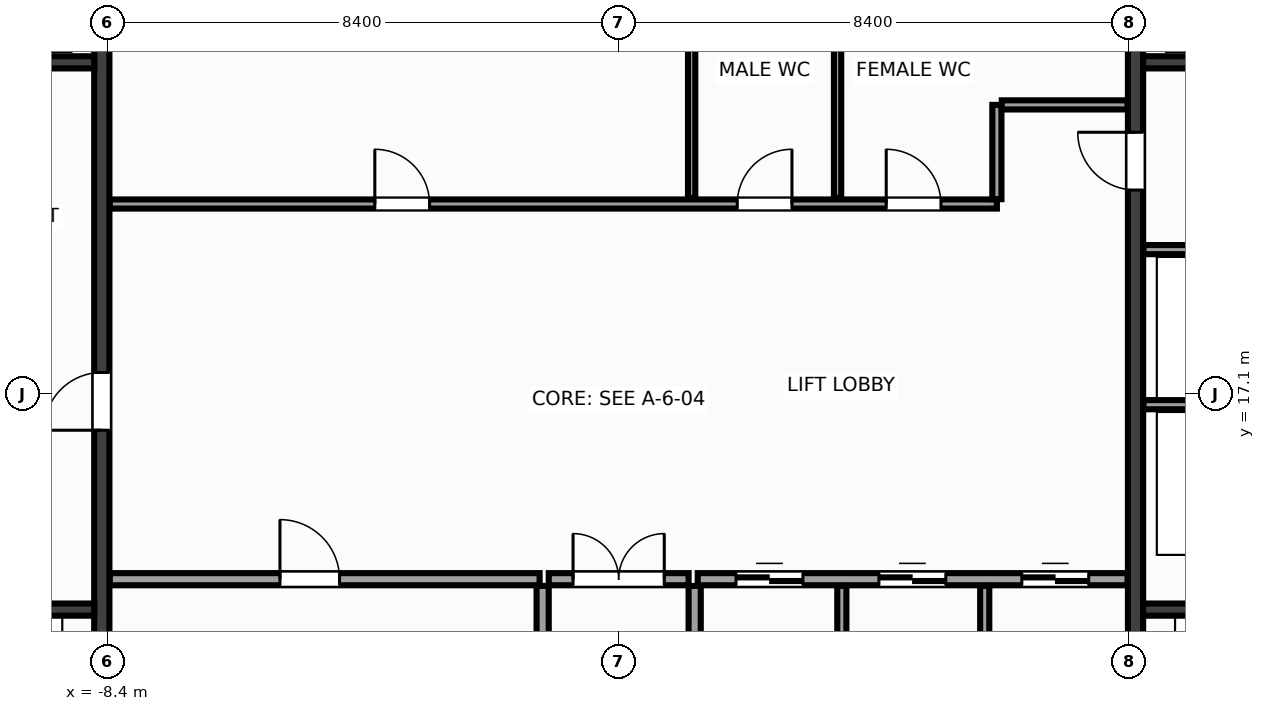
"""IFC4 building model, lengths in metres.
Left out: names, types, materials, properties, quantities, classifications, styles, units other than length and angle.
Written with IfcOpenShell. Run it as: python <this file> out.ifc"""

import sys

from ifc_helpers import new_model, si_unit, direction, frame, frame_2d, origin, place, context, subcontext, project, spatial, rectangle, extrude, source, transform, mapped, element, fill, save


model = new_model("IFC4")
c1 = context("Model", 3, precision=1e-05, world=origin(), true_north=direction((0.0, 1.0)))
c2 = subcontext(c1, "Body", "Model", "MODEL_VIEW")
j1 = project(units=[si_unit("LENGTHUNIT", "METRE"), si_unit("PLANEANGLEUNIT", "RADIAN")], contexts=[c1])
p1 = place(None, origin())
s1 = spatial("IfcSite", under=j1, at=p1, CompositionType="ELEMENT")
p2 = place(p1, origin())
s2 = spatial("IfcBuilding", under=s1, at=p2, CompositionType="ELEMENT")
p3 = place(p2, frame((0.0, 0.0, 84.8)))
s3 = spatial("IfcBuildingStorey", under=s2, at=p3, CompositionType="ELEMENT", Elevation=84.8)
m1 = source(origin(), c2, "Body", "SweptSolid", [
    extrude(rectangle(XDim=12.95, YDim=0.25, at=frame_2d((6.475, 0.0))), origin(), (0.0, 0.0, 1.0), 3.6),
])
p4 = place(p3, frame((-8.5, 10.525, 0.0), z_axis=(0.0, 0.0, 1.0), x_axis=(0.0, 1.0, 0.0)))
e1 = element("IfcWall", 1, at=p4, inside=s3, PredefinedType="SHEAR", context=c2, shape_type="MappedRepresentation", body=[
    mapped(m1, transform((0.0, 0.0, 0.0), x_axis=(1.0, 0.0, 0.0), y_axis=(0.0, 1.0, 0.0), z_axis=(0.0, 0.0, 1.0), scale=1.0)),
])
p5 = place(p4, frame((5.975, 0.0, 0.0)))
e2 = element("IfcOpeningElement", 2, at=p5, cuts=e1, PredefinedType="OPENING", context=c2, shape_type="SweptSolid", body=[
    extrude(rectangle(XDim=0.95, YDim=2.15, at=frame_2d((0.475, 1.075))), frame((0.0, 0.137, 0.0), z_axis=(0.0, -1.0, 0.0), x_axis=(1.0, 0.0, 0.0)), (0.0, 0.0, 1.0), 0.274),
])
p6 = place(p3, frame((8.5, 10.525, 0.0), z_axis=(0.0, 0.0, 1.0), x_axis=(0.0, 1.0, 0.0)))
e3 = element("IfcWall", 3, at=p6, inside=s3, PredefinedType="SHEAR", context=c2, shape_type="MappedRepresentation", body=[
    mapped(m1, transform((0.0, 0.0, 0.0), x_axis=(1.0, 0.0, 0.0), y_axis=(0.0, 1.0, 0.0), z_axis=(0.0, 0.0, 1.0), scale=1.0)),
])
p7 = place(p6, frame((9.925, 0.0, 0.0)))
e4 = element("IfcOpeningElement", 4, at=p7, cuts=e3, PredefinedType="OPENING", context=c2, shape_type="SweptSolid", body=[
    extrude(rectangle(XDim=0.95, YDim=2.15, at=frame_2d((0.475, 1.075))), frame((0.0, 0.137, 0.0), z_axis=(0.0, -1.0, 0.0), x_axis=(1.0, 0.0, 0.0)), (0.0, 0.0, 1.0), 0.274),
])
m2 = source(origin(), c2, "Body", "SweptSolid", [
    extrude(rectangle(XDim=2.825, YDim=0.2, at=frame_2d((1.413, 0.0))), origin(), (0.0, 0.0, 1.0), 3.6),
])
for number, where, z_axis, x_axis in (
    (5, (-11.45, 13.55, 0.0), (0.0, 0.0, 1.0), (1.0, 0.0, 0.0)),
    (6, (8.625, 13.55, 0.0), (0.0, 0.0, 1.0), (1.0, 0.0, 0.0)),
):
    element("IfcWall", number, at=place(p3, frame(where, z_axis=z_axis, x_axis=x_axis)), inside=s3, PredefinedType="SHEAR", context=c2, shape_type="MappedRepresentation", body=[
        mapped(m2, transform((0.0, 0.0, 0.0), x_axis=(1.0, 0.0, 0.0), y_axis=(0.0, 1.0, 0.0), z_axis=(0.0, 0.0, 1.0), scale=1.0)),
    ])
m3 = source(origin(), c2, "Body", "SweptSolid", [
    extrude(rectangle(XDim=3.02, YDim=0.2, at=frame_2d((1.51, 0.0))), origin(), (0.0, 0.0, 1.0), 3.6),
])
for number, where, z_axis, x_axis in (
    (7, (-11.645, 22.55, 0.0), (0.0, 0.0, 1.0), (1.0, 0.0, 0.0)),
    (8, (8.625, 22.55, 0.0), (0.0, 0.0, 1.0), (1.0, 0.0, 0.0)),
):
    element("IfcWall", number, at=place(p3, frame(where, z_axis=z_axis, x_axis=x_axis)), inside=s3, PredefinedType="SHEAR", context=c2, shape_type="MappedRepresentation", body=[
        mapped(m3, transform((0.0, 0.0, 0.0), x_axis=(1.0, 0.0, 0.0), y_axis=(0.0, 1.0, 0.0), z_axis=(0.0, 0.0, 1.0), scale=1.0)),
    ])
m4 = source(origin(), c2, "Body", "SweptSolid", [
    extrude(rectangle(XDim=3.01, YDim=0.15, at=frame_2d((1.505, 0.0))), origin(), (0.0, 0.0, 1.0), 3.36),
])
for number, where, z_axis, x_axis in (
    (9, (8.63, 16.92, 0.0), (0.0, 0.0, 1.0), (1.0, 0.0, 0.0)),
    (10, (8.63, 19.47, 0.0), (0.0, 0.0, 1.0), (1.0, 0.0, 0.0)),
):
    element("IfcWall", number, at=place(p3, frame(where, z_axis=z_axis, x_axis=x_axis)), inside=s3, PredefinedType="PARTITIONING", context=c2, shape_type="MappedRepresentation", body=[
        mapped(m4, transform((0.0, 0.0, 0.0), x_axis=(1.0, 0.0, 0.0), y_axis=(0.0, 1.0, 0.0), z_axis=(0.0, 0.0, 1.0), scale=1.0)),
    ])
m5 = source(origin(), c2, "Body", "SweptSolid", [
    extrude(rectangle(XDim=7.07, YDim=0.2, at=frame_2d((3.535, 0.0))), origin(), (0.0, 0.0, 1.0), 3.36),
])
p8 = place(p3, frame((-8.37, 14.05, 0.0), z_axis=(0.0, 0.0, 1.0), x_axis=(1.0, 0.0, 0.0)))
e11 = element("IfcWall", 11, at=p8, inside=s3, PredefinedType="PARTITIONING", context=c2, shape_type="MappedRepresentation", body=[
    mapped(m5, transform((0.0, 0.0, 0.0), x_axis=(1.0, 0.0, 0.0), y_axis=(0.0, 1.0, 0.0), z_axis=(0.0, 0.0, 1.0), scale=1.0)),
])
p9 = place(p8, frame((2.8, 0.0, 0.0)))
e12 = element("IfcOpeningElement", 12, at=p9, cuts=e11, PredefinedType="OPENING", context=c2, shape_type="SweptSolid", body=[
    extrude(rectangle(XDim=0.98, YDim=2.15, at=frame_2d((0.49, 1.075))), frame((0.0, 0.112, 0.0), z_axis=(0.0, -1.0, 0.0), x_axis=(1.0, 0.0, 0.0)), (0.0, 0.0, 1.0), 0.224),
])
p10 = place(p3, frame((1.3, 14.05, 0.0), z_axis=(0.0, 0.0, 1.0), x_axis=(1.0, 0.0, 0.0)))
e13 = element("IfcWall", 13, at=p10, inside=s3, PredefinedType="PARTITIONING", context=c2, shape_type="MappedRepresentation", body=[
    mapped(m5, transform((0.0, 0.0, 0.0), x_axis=(1.0, 0.0, 0.0), y_axis=(0.0, 1.0, 0.0), z_axis=(0.0, 0.0, 1.0), scale=1.0)),
])
p11 = place(p10, frame((0.63, 0.0, 0.0)))
e14 = element("IfcOpeningElement", 14, at=p11, cuts=e13, PredefinedType="OPENING", context=c2, shape_type="SweptSolid", body=[
    extrude(rectangle(XDim=1.1, YDim=2.15, at=frame_2d((0.55, 1.075))), frame((0.0, 0.112, 0.0), z_axis=(0.0, -1.0, 0.0), x_axis=(1.0, 0.0, 0.0)), (0.0, 0.0, 1.0), 0.224),
])
p12 = place(p10, frame((2.98, 0.0, 0.0)))
e15 = element("IfcOpeningElement", 15, at=p12, cuts=e13, PredefinedType="OPENING", context=c2, shape_type="SweptSolid", body=[
    extrude(rectangle(XDim=1.1, YDim=2.15, at=frame_2d((0.55, 1.075))), frame((0.0, 0.112, 0.0), z_axis=(0.0, -1.0, 0.0), x_axis=(1.0, 0.0, 0.0)), (0.0, 0.0, 1.0), 0.224),
])
p13 = place(p10, frame((5.33, 0.0, 0.0)))
e16 = element("IfcOpeningElement", 16, at=p13, cuts=e13, PredefinedType="OPENING", context=c2, shape_type="SweptSolid", body=[
    extrude(rectangle(XDim=1.1, YDim=2.15, at=frame_2d((0.55, 1.075))), frame((0.0, 0.112, 0.0), z_axis=(0.0, -1.0, 0.0), x_axis=(1.0, 0.0, 0.0)), (0.0, 0.0, 1.0), 0.224),
])
m6 = source(origin(), c2, "Body", "SweptSolid", [
    extrude(rectangle(XDim=3.415, YDim=0.2, at=frame_2d((1.708, 0.0))), origin(), (0.0, 0.0, 1.0), 3.36),
])
for number, where, z_axis, x_axis in (
    (17, (-1.25, 10.525, 0.0), (0.0, 0.0, 1.0), (0.0, 1.0, 0.0)),
    (18, (1.25, 10.525, 0.0), (0.0, 0.0, 1.0), (0.0, 1.0, 0.0)),
):
    element("IfcWall", number, at=place(p3, frame(where, z_axis=z_axis, x_axis=x_axis)), inside=s3, PredefinedType="PARTITIONING", context=c2, shape_type="MappedRepresentation", body=[
        mapped(m6, transform((0.0, 0.0, 0.0), x_axis=(1.0, 0.0, 0.0), y_axis=(0.0, 1.0, 0.0), z_axis=(0.0, 0.0, 1.0), scale=1.0)),
    ])
m7 = source(origin(), c2, "Body", "SweptSolid", [
    extrude(rectangle(XDim=2.3, YDim=0.2, at=frame_2d((1.15, 0.0))), origin(), (0.0, 0.0, 1.0), 3.36),
])
p14 = place(p3, frame((-1.15, 14.05, 0.0), z_axis=(0.0, 0.0, 1.0), x_axis=(1.0, 0.0, 0.0)))
e19 = element("IfcWall", 19, at=p14, inside=s3, PredefinedType="PARTITIONING", context=c2, shape_type="MappedRepresentation", body=[
    mapped(m7, transform((0.0, 0.0, 0.0), x_axis=(1.0, 0.0, 0.0), y_axis=(0.0, 1.0, 0.0), z_axis=(0.0, 0.0, 1.0), scale=1.0)),
])
p15 = place(p14, frame((0.4, 0.0, 0.0)))
e20 = element("IfcOpeningElement", 20, at=p15, cuts=e19, PredefinedType="OPENING", context=c2, shape_type="SweptSolid", body=[
    extrude(rectangle(XDim=1.5, YDim=2.2, at=frame_2d((0.75, 1.1))), frame((0.0, 0.112, 0.0), z_axis=(0.0, -1.0, 0.0), x_axis=(1.0, 0.0, 0.0)), (0.0, 0.0, 1.0), 0.224),
])
m8 = source(origin(), c2, "Body", "SweptSolid", [
    extrude(rectangle(XDim=14.59, YDim=0.15, at=frame_2d((7.295, 0.0))), origin(), (0.0, 0.0, 1.0), 3.36),
])
p16 = place(p3, frame((-8.37, 20.22, 0.0), z_axis=(0.0, 0.0, 1.0), x_axis=(1.0, 0.0, 0.0)))
e21 = element("IfcWall", 21, at=p16, inside=s3, PredefinedType="PARTITIONING", context=c2, shape_type="MappedRepresentation", body=[
    mapped(m8, transform((0.0, 0.0, 0.0), x_axis=(1.0, 0.0, 0.0), y_axis=(0.0, 1.0, 0.0), z_axis=(0.0, 0.0, 1.0), scale=1.0)),
])
p17 = place(p16, frame((4.36, 0.0, 0.0)))
e22 = element("IfcOpeningElement", 22, at=p17, cuts=e21, PredefinedType="OPENING", context=c2, shape_type="SweptSolid", body=[
    extrude(rectangle(XDim=0.9, YDim=2.15, at=frame_2d((0.45, 1.075))), frame((0.0, 0.087, 0.0), z_axis=(0.0, -1.0, 0.0), x_axis=(1.0, 0.0, 0.0)), (0.0, 0.0, 1.0), 0.174),
])
p18 = place(p16, frame((10.32, 0.0, 0.0)))
e23 = element("IfcOpeningElement", 23, at=p18, cuts=e21, PredefinedType="OPENING", context=c2, shape_type="SweptSolid", body=[
    extrude(rectangle(XDim=0.9, YDim=2.15, at=frame_2d((0.45, 1.075))), frame((0.0, 0.087, 0.0), z_axis=(0.0, -1.0, 0.0), x_axis=(1.0, 0.0, 0.0)), (0.0, 0.0, 1.0), 0.174),
])
p19 = place(p16, frame((12.77, 0.0, 0.0)))
e24 = element("IfcOpeningElement", 24, at=p19, cuts=e21, PredefinedType="OPENING", context=c2, shape_type="SweptSolid", body=[
    extrude(rectangle(XDim=0.9, YDim=2.15, at=frame_2d((0.45, 1.075))), frame((0.0, 0.087, 0.0), z_axis=(0.0, -1.0, 0.0), x_axis=(1.0, 0.0, 0.0)), (0.0, 0.0, 1.0), 0.174),
])
m9 = source(origin(), c2, "Body", "SweptSolid", [
    extrude(rectangle(XDim=1.55, YDim=0.15, at=frame_2d((0.775, 0.0))), origin(), (0.0, 0.0, 1.0), 3.36),
])
p20 = place(p3, frame((6.22, 20.3, 0.0), z_axis=(0.0, 0.0, 1.0), x_axis=(0.0, 1.0, 0.0)))
e25 = element("IfcWall", 25, at=p20, inside=s3, PredefinedType="PARTITIONING", context=c2, shape_type="MappedRepresentation", body=[
    mapped(m9, transform((0.0, 0.0, 0.0), x_axis=(1.0, 0.0, 0.0), y_axis=(0.0, 1.0, 0.0), z_axis=(0.0, 0.0, 1.0), scale=1.0)),
])
m10 = source(origin(), c2, "Body", "SweptSolid", [
    extrude(rectangle(XDim=2.07, YDim=0.15, at=frame_2d((1.035, 0.0))), origin(), (0.0, 0.0, 1.0), 3.36),
])
p21 = place(p3, frame((6.3, 21.85, 0.0), z_axis=(0.0, 0.0, 1.0), x_axis=(1.0, 0.0, 0.0)))
e26 = element("IfcWall", 26, at=p21, inside=s3, PredefinedType="PARTITIONING", context=c2, shape_type="MappedRepresentation", body=[
    mapped(m10, transform((0.0, 0.0, 0.0), x_axis=(1.0, 0.0, 0.0), y_axis=(0.0, 1.0, 0.0), z_axis=(0.0, 0.0, 1.0), scale=1.0)),
])
m11 = source(origin(), c2, "Body", "SweptSolid", [
    extrude(rectangle(XDim=3.415, YDim=0.15, at=frame_2d((1.708, 0.0))), origin(), (0.0, 0.0, 1.0), 3.36),
])
for number, where, z_axis, x_axis in (
    (27, (3.67, 10.525, 0.0), (0.0, 0.0, 1.0), (0.0, 1.0, 0.0)),
    (28, (6.02, 10.525, 0.0), (0.0, 0.0, 1.0), (0.0, 1.0, 0.0)),
):
    element("IfcWall", number, at=place(p3, frame(where, z_axis=z_axis, x_axis=x_axis)), inside=s3, PredefinedType="PARTITIONING", context=c2, shape_type="MappedRepresentation", body=[
        mapped(m11, transform((0.0, 0.0, 0.0), x_axis=(1.0, 0.0, 0.0), y_axis=(0.0, 1.0, 0.0), z_axis=(0.0, 0.0, 1.0), scale=1.0)),
    ])
m12 = source(origin(), c2, "Body", "SweptSolid", [
    extrude(rectangle(XDim=3.115, YDim=0.12, at=frame_2d((1.558, 0.0))), origin(), (0.0, 0.0, 1.0), 3.36),
])
for number, where, z_axis, x_axis in (
    (29, (1.2, 20.32, 0.0), (0.0, 0.0, 1.0), (0.0, 1.0, 0.0)),
    (30, (3.6, 20.32, 0.0), (0.0, 0.0, 1.0), (0.0, 1.0, 0.0)),
):
    element("IfcWall", number, at=place(p3, frame(where, z_axis=z_axis, x_axis=x_axis)), inside=s3, PredefinedType="PARTITIONING", context=c2, shape_type="MappedRepresentation", body=[
        mapped(m12, transform((0.0, 0.0, 0.0), x_axis=(1.0, 0.0, 0.0), y_axis=(0.0, 1.0, 0.0), z_axis=(0.0, 0.0, 1.0), scale=1.0)),
    ])
m13 = source(origin(), c2, "Body", "SweptSolid", [
    extrude(rectangle(XDim=0.95, YDim=2.15, at=frame_2d((0.475, 1.075))), frame((0.0, 0.025, 0.0), z_axis=(0.0, -1.0, 0.0), x_axis=(1.0, 0.0, 0.0)), (0.0, 0.0, 1.0), 0.05),
])
p22 = place(p5, origin())
e31 = element("IfcDoor", 31, at=p22, inside=s3, OperationType="SINGLE_SWING_LEFT", PredefinedType="DOOR", context=c2, shape_type="MappedRepresentation", body=[
    mapped(m13, transform((0.0, 0.0, 0.0), x_axis=(1.0, 0.0, 0.0), y_axis=(0.0, 1.0, 0.0), z_axis=(0.0, 0.0, 1.0), scale=1.0)),
])
fill(e2, e31)
m14 = source(origin(), c2, "Body", "SweptSolid", [
    extrude(rectangle(XDim=0.95, YDim=2.15, at=frame_2d((0.475, 1.075))), frame((0.0, 0.025, 0.0), z_axis=(0.0, -1.0, 0.0), x_axis=(1.0, 0.0, 0.0)), (0.0, 0.0, 1.0), 0.05),
])
p23 = place(p7, origin())
e32 = element("IfcDoor", 32, at=p23, inside=s3, OperationType="SINGLE_SWING_RIGHT", PredefinedType="DOOR", context=c2, shape_type="MappedRepresentation", body=[
    mapped(m14, transform((0.0, 0.0, 0.0), x_axis=(1.0, 0.0, 0.0), y_axis=(0.0, 1.0, 0.0), z_axis=(0.0, 0.0, 1.0), scale=1.0)),
])
fill(e4, e32)
m15 = source(origin(), c2, "Body", "SweptSolid", [
    extrude(rectangle(XDim=0.98, YDim=2.15, at=frame_2d((0.49, 1.075))), frame((0.0, 0.025, 0.0), z_axis=(0.0, -1.0, 0.0), x_axis=(1.0, 0.0, 0.0)), (0.0, 0.0, 1.0), 0.05),
])
p24 = place(p9, origin())
e33 = element("IfcDoor", 33, at=p24, inside=s3, OperationType="SINGLE_SWING_LEFT", PredefinedType="DOOR", context=c2, shape_type="MappedRepresentation", body=[
    mapped(m15, transform((0.0, 0.0, 0.0), x_axis=(1.0, 0.0, 0.0), y_axis=(0.0, 1.0, 0.0), z_axis=(0.0, 0.0, 1.0), scale=1.0)),
])
fill(e12, e33)
m16 = source(origin(), c2, "Body", "SweptSolid", [
    extrude(rectangle(XDim=1.1, YDim=2.15, at=frame_2d((0.55, 1.075))), frame((0.0, 0.025, 0.0), z_axis=(0.0, -1.0, 0.0), x_axis=(1.0, 0.0, 0.0)), (0.0, 0.0, 1.0), 0.05),
])
p25 = place(p11, origin())
e34 = element("IfcDoor", 34, at=p25, inside=s3, OperationType="DOUBLE_DOOR_SLIDING", PredefinedType="DOOR", context=c2, shape_type="MappedRepresentation", body=[
    mapped(m16, transform((0.0, 0.0, 0.0), x_axis=(1.0, 0.0, 0.0), y_axis=(0.0, 1.0, 0.0), z_axis=(0.0, 0.0, 1.0), scale=1.0)),
])
fill(e14, e34)
p26 = place(p12, origin())
e35 = element("IfcDoor", 35, at=p26, inside=s3, OperationType="DOUBLE_DOOR_SLIDING", PredefinedType="DOOR", context=c2, shape_type="MappedRepresentation", body=[
    mapped(m16, transform((0.0, 0.0, 0.0), x_axis=(1.0, 0.0, 0.0), y_axis=(0.0, 1.0, 0.0), z_axis=(0.0, 0.0, 1.0), scale=1.0)),
])
fill(e15, e35)
p27 = place(p13, origin())
e36 = element("IfcDoor", 36, at=p27, inside=s3, OperationType="DOUBLE_DOOR_SLIDING", PredefinedType="DOOR", context=c2, shape_type="MappedRepresentation", body=[
    mapped(m16, transform((0.0, 0.0, 0.0), x_axis=(1.0, 0.0, 0.0), y_axis=(0.0, 1.0, 0.0), z_axis=(0.0, 0.0, 1.0), scale=1.0)),
])
fill(e16, e36)
m17 = source(origin(), c2, "Body", "SweptSolid", [
    extrude(rectangle(XDim=1.5, YDim=2.2, at=frame_2d((0.75, 1.1))), frame((0.0, 0.025, 0.0), z_axis=(0.0, -1.0, 0.0), x_axis=(1.0, 0.0, 0.0)), (0.0, 0.0, 1.0), 0.05),
])
p28 = place(p15, origin())
e37 = element("IfcDoor", 37, at=p28, inside=s3, OperationType="DOUBLE_DOOR_SINGLE_SWING", PredefinedType="DOOR", context=c2, shape_type="MappedRepresentation", body=[
    mapped(m17, transform((0.0, 0.0, 0.0), x_axis=(1.0, 0.0, 0.0), y_axis=(0.0, 1.0, 0.0), z_axis=(0.0, 0.0, 1.0), scale=1.0)),
])
fill(e20, e37)
m18 = source(origin(), c2, "Body", "SweptSolid", [
    extrude(rectangle(XDim=0.9, YDim=2.15, at=frame_2d((0.45, 1.075))), frame((0.0, 0.025, 0.0), z_axis=(0.0, -1.0, 0.0), x_axis=(1.0, 0.0, 0.0)), (0.0, 0.0, 1.0), 0.05),
])
p29 = place(p17, origin())
e38 = element("IfcDoor", 38, at=p29, inside=s3, OperationType="SINGLE_SWING_LEFT", PredefinedType="DOOR", context=c2, shape_type="MappedRepresentation", body=[
    mapped(m18, transform((0.0, 0.0, 0.0), x_axis=(1.0, 0.0, 0.0), y_axis=(0.0, 1.0, 0.0), z_axis=(0.0, 0.0, 1.0), scale=1.0)),
])
fill(e22, e38)
p30 = place(p18, origin())
e39 = element("IfcDoor", 39, at=p30, inside=s3, OperationType="SINGLE_SWING_RIGHT", PredefinedType="DOOR", context=c2, shape_type="MappedRepresentation", body=[
    mapped(m18, transform((0.0, 0.0, 0.0), x_axis=(1.0, 0.0, 0.0), y_axis=(0.0, 1.0, 0.0), z_axis=(0.0, 0.0, 1.0), scale=1.0)),
])
fill(e23, e39)
p31 = place(p19, origin())
e40 = element("IfcDoor", 40, at=p31, inside=s3, OperationType="SINGLE_SWING_LEFT", PredefinedType="DOOR", context=c2, shape_type="MappedRepresentation", body=[
    mapped(m18, transform((0.0, 0.0, 0.0), x_axis=(1.0, 0.0, 0.0), y_axis=(0.0, 1.0, 0.0), z_axis=(0.0, 0.0, 1.0), scale=1.0)),
])
fill(e24, e40)
save(model, sys.argv[1])
